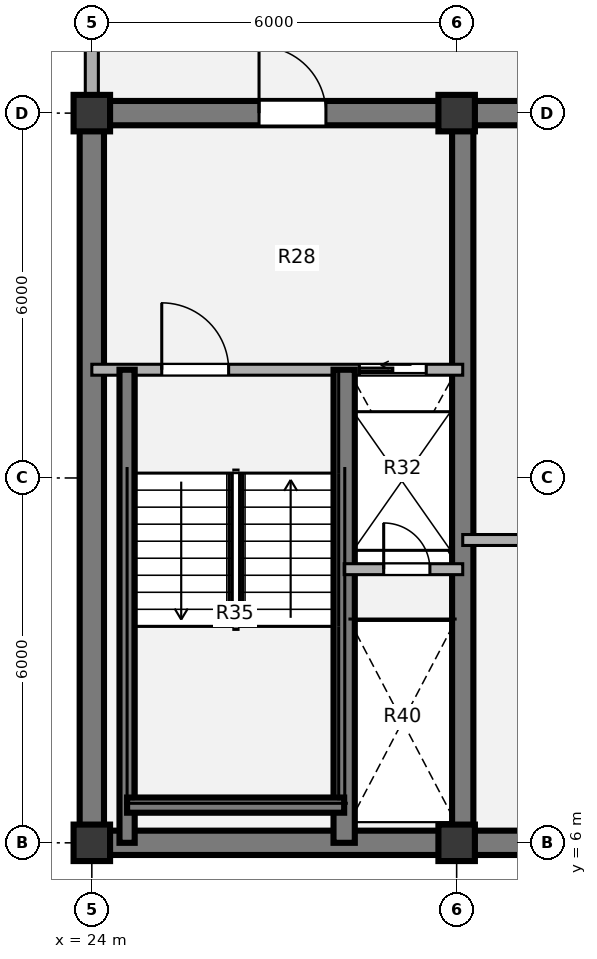
"""IFC4 building model, lengths in metres.
Left out: names, types, materials, properties, quantities, classifications, styles, units other than length and angle.
Written with IfcOpenShell. Run it as: python <this file> out.ifc"""

import sys

from ifc_helpers import new_model, si_unit, direction, frame, frame_2d, origin, origin_2d, place, context, subcontext, project, spatial, rectangle, extrude, source, transform, mapped, element, fill, save


model = new_model("IFC4")
c1 = context("Model", 3, precision=1e-05, world=origin(), true_north=direction((0.0, 1.0)))
c2 = subcontext(c1, "Body", "Model", "MODEL_VIEW")
j1 = project(units=[si_unit("LENGTHUNIT", "METRE"), si_unit("PLANEANGLEUNIT", "RADIAN")], contexts=[c1])
p1 = place(None, origin())
s1 = spatial("IfcSite", under=j1, at=p1, CompositionType="ELEMENT")
p2 = place(p1, origin())
s2 = spatial("IfcBuilding", under=s1, at=p2, CompositionType="ELEMENT")
p3 = place(p2, frame((0.0, 0.0, 230.58)))
s3 = spatial("IfcBuildingStorey", under=s2, at=p3, CompositionType="ELEMENT", Elevation=230.58)
m1 = source(origin(), c2, "Body", "SweptSolid", [
    extrude(rectangle(XDim=0.6, YDim=0.6, at=origin_2d()), origin(), (0.0, 0.0, 1.0), 3.78),
])
for number, where, z_axis, x_axis in (
    (1, (24.0, 6.0, 0.0), (0.0, 0.0, 1.0), (1.0, 0.0, 0.0)),
    (2, (30.0, 6.0, 0.0), (0.0, 0.0, 1.0), (1.0, 0.0, 0.0)),
    (3, (24.0, 18.0, 0.0), (0.0, 0.0, 1.0), (1.0, 0.0, 0.0)),
    (4, (30.0, 18.0, 0.0), (0.0, 0.0, 1.0), (1.0, 0.0, 0.0)),
):
    element("IfcColumn", number, at=place(p3, frame(where, z_axis=z_axis, x_axis=x_axis)), inside=s3, PredefinedType="COLUMN", context=c2, shape_type="MappedRepresentation", body=[
        mapped(m1, transform((0.0, 0.0, 0.0), x_axis=(1.0, 0.0, 0.0), y_axis=(0.0, 1.0, 0.0), z_axis=(0.0, 0.0, 1.0), scale=1.0)),
    ])
p4 = place(p3, frame((48.2, 6.0, 0.0), z_axis=(0.0, 0.0, 1.0), x_axis=(-1.0, 0.0, 0.0)))
e5 = element("IfcWall", 5, at=p4, inside=s3, PredefinedType="SHEAR", context=c2, shape_type="SweptSolid", body=[
    extrude(rectangle(XDim=24.4, YDim=0.4, at=frame_2d((12.2, 0.0))), origin(), (0.0, 0.0, 1.0), 3.78),
])
p5 = place(p3, frame((24.0, 6.0, 0.0), z_axis=(0.0, 0.0, 1.0), x_axis=(0.0, 1.0, 0.0)))
e6 = element("IfcWall", 6, at=p5, inside=s3, PredefinedType="SHEAR", context=c2, shape_type="SweptSolid", body=[
    extrude(rectangle(XDim=12.0, YDim=0.4, at=frame_2d((6.0, 0.0))), origin(), (0.0, 0.0, 1.0), 3.78),
])
p6 = place(p3, frame((23.8, 18.0, 0.0), z_axis=(0.0, 0.0, 1.0), x_axis=(1.0, 0.0, 0.0)))
e7 = element("IfcWall", 7, at=p6, inside=s3, PredefinedType="SHEAR", context=c2, shape_type="SweptSolid", body=[
    extrude(rectangle(XDim=9.4, YDim=0.4, at=frame_2d((4.7, 0.0))), origin(), (0.0, 0.0, 1.0), 3.78),
])
p7 = place(p6, frame((2.95, 0.0, 0.0)))
e8 = element("IfcOpeningElement", 8, at=p7, cuts=e7, PredefinedType="OPENING", context=c2, shape_type="SweptSolid", body=[
    extrude(rectangle(XDim=1.1, YDim=2.1, at=origin_2d()), frame((0.55, 0.21, 1.05), z_axis=(0.0, -1.0, 0.0), x_axis=(1.0, 0.0, 0.0)), (0.0, 0.0, 1.0), 0.42),
])
p8 = place(p3, frame((30.1, 6.0, 0.0), z_axis=(0.0, 0.0, 1.0), x_axis=(0.0, 1.0, 0.0)))
e9 = element("IfcWall", 9, at=p8, inside=s3, PredefinedType="SHEAR", context=c2, shape_type="SweptSolid", body=[
    extrude(rectangle(XDim=12.0, YDim=0.35, at=frame_2d((6.0, 0.0))), origin(), (0.0, 0.0, 1.0), 3.78),
])
p9 = place(p3, frame((24.0, 18.28, 0.0), z_axis=(0.0, 0.0, 1.0), x_axis=(0.0, 1.0, 0.0)))
e10 = element("IfcWall", 10, at=p9, inside=s3, PredefinedType="SOLIDWALL", context=c2, shape_type="SweptSolid", body=[
    extrude(rectangle(XDim=2.77, YDim=0.215, at=frame_2d((1.385, 0.0))), origin(), (0.0, 0.0, 1.0), 2.718),
])
p10 = place(p3, frame((30.1, 10.98, 0.0), z_axis=(0.0, 0.0, 1.0), x_axis=(1.0, 0.0, 0.0)))
e11 = element("IfcWall", 11, at=p10, inside=s3, PredefinedType="PARTITIONING", context=c2, shape_type="SweptSolid", body=[
    extrude(rectangle(XDim=4.08, YDim=0.18, at=frame_2d((2.04, 0.0))), origin(), (0.0, 0.0, 1.0), 3.5),
])
p11 = place(p3, frame((24.0, 13.78, 0.0), z_axis=(0.0, 0.0, 1.0), x_axis=(1.0, 0.0, 0.0)))
e12 = element("IfcWall", 12, at=p11, inside=s3, PredefinedType="PARTITIONING", context=c2, shape_type="SweptSolid", body=[
    extrude(rectangle(XDim=6.1, YDim=0.18, at=frame_2d((3.05, 0.0))), origin(), (0.0, 0.0, 1.0), 3.5),
])
p12 = place(p11, frame((1.15, 0.0, 0.0)))
e13 = element("IfcOpeningElement", 13, at=p12, cuts=e12, PredefinedType="OPENING", context=c2, shape_type="SweptSolid", body=[
    extrude(rectangle(XDim=1.1, YDim=2.1, at=origin_2d()), frame((0.55, 0.1, 1.05), z_axis=(0.0, -1.0, 0.0), x_axis=(1.0, 0.0, 0.0)), (0.0, 0.0, 1.0), 0.2),
])
p13 = place(p11, frame((4.4, 0.0, 0.0)))
e14 = element("IfcOpeningElement", 14, at=p13, cuts=e12, PredefinedType="OPENING", context=c2, shape_type="SweptSolid", body=[
    extrude(rectangle(XDim=1.1, YDim=2.1, at=origin_2d()), frame((0.55, 0.1, 1.05), z_axis=(0.0, -1.0, 0.0), x_axis=(1.0, 0.0, 0.0)), (0.0, 0.0, 1.0), 0.2),
])
p14 = place(p3, frame((28.15, 6.0, 0.0), z_axis=(0.0, 0.0, 1.0), x_axis=(0.0, 1.0, 0.0)))
e15 = element("IfcWall", 15, at=p14, inside=s3, PredefinedType="SHEAR", context=c2, shape_type="SweptSolid", body=[
    extrude(rectangle(XDim=7.78, YDim=0.35, at=frame_2d((3.89, 0.0))), origin(), (0.0, 0.0, 1.0), 3.85),
])
p15 = place(p3, frame((24.58, 6.0, 0.0), z_axis=(0.0, 0.0, 1.0), x_axis=(0.0, 1.0, 0.0)))
e16 = element("IfcWall", 16, at=p15, inside=s3, PredefinedType="SHEAR", context=c2, shape_type="SweptSolid", body=[
    extrude(rectangle(XDim=7.78, YDim=0.25, at=frame_2d((3.89, 0.0))), origin(), (0.0, 0.0, 1.0), 3.85),
])
p16 = place(p3, frame((24.58, 6.62, 0.0), z_axis=(0.0, 0.0, 1.0), x_axis=(1.0, 0.0, 0.0)))
e17 = element("IfcWall", 17, at=p16, inside=s3, PredefinedType="SHEAR", context=c2, shape_type="SweptSolid", body=[
    extrude(rectangle(XDim=3.57, YDim=0.25, at=frame_2d((1.785, 0.0))), origin(), (0.0, 0.0, 1.0), 3.85),
])
p17 = place(p3, frame((28.15, 10.5, 0.0), z_axis=(0.0, 0.0, 1.0), x_axis=(1.0, 0.0, 0.0)))
e18 = element("IfcWall", 18, at=p17, inside=s3, PredefinedType="PARTITIONING", context=c2, shape_type="SweptSolid", body=[
    extrude(rectangle(XDim=1.95, YDim=0.18, at=frame_2d((0.975, 0.0))), origin(), (0.0, 0.0, 1.0), 3.5),
])
p18 = place(p17, frame((0.65, 0.0, 0.0)))
e19 = element("IfcOpeningElement", 19, at=p18, cuts=e18, PredefinedType="OPENING", context=c2, shape_type="SweptSolid", body=[
    extrude(rectangle(XDim=0.76, YDim=2.05, at=origin_2d()), frame((0.38, 0.1, 1.025), z_axis=(0.0, -1.0, 0.0), x_axis=(1.0, 0.0, 0.0)), (0.0, 0.0, 1.0), 0.2),
])
m2 = source(origin(), c2, "Body", "SweptSolid", [
    extrude(rectangle(XDim=1.1, YDim=2.1, at=origin_2d()), frame((0.55, 0.025, 1.05), z_axis=(0.0, -1.0, 0.0), x_axis=(1.0, 0.0, 0.0)), (0.0, 0.0, 1.0), 0.05),
])
p19 = place(p12, origin())
e20 = element("IfcDoor", 20, at=p19, inside=s3, OperationType="SINGLE_SWING_LEFT", PredefinedType="DOOR", context=c2, shape_type="MappedRepresentation", body=[
    mapped(m2, transform((0.0, 0.0, 0.0), x_axis=(1.0, 0.0, 0.0), y_axis=(0.0, 1.0, 0.0), z_axis=(0.0, 0.0, 1.0), scale=1.0)),
])
fill(e13, e20)
m3 = source(origin(), c2, "Body", "SweptSolid", [
    extrude(rectangle(XDim=1.1, YDim=2.1, at=origin_2d()), frame((0.55, 0.025, 1.05), z_axis=(0.0, -1.0, 0.0), x_axis=(1.0, 0.0, 0.0)), (0.0, 0.0, 1.0), 0.05),
])
p20 = place(p13, origin())
e21 = element("IfcDoor", 21, at=p20, inside=s3, OperationType="SLIDING_TO_LEFT", PredefinedType="DOOR", context=c2, shape_type="MappedRepresentation", body=[
    mapped(m3, transform((0.0, 0.0, 0.0), x_axis=(1.0, 0.0, 0.0), y_axis=(0.0, 1.0, 0.0), z_axis=(0.0, 0.0, 1.0), scale=1.0)),
])
fill(e14, e21)
m4 = source(origin(), c2, "Body", "SweptSolid", [
    extrude(rectangle(XDim=0.76, YDim=2.05, at=origin_2d()), frame((0.38, 0.025, 1.025), z_axis=(0.0, -1.0, 0.0), x_axis=(1.0, 0.0, 0.0)), (0.0, 0.0, 1.0), 0.05),
])
p21 = place(p18, origin())
e22 = element("IfcDoor", 22, at=p21, inside=s3, OperationType="SINGLE_SWING_LEFT", PredefinedType="DOOR", context=c2, shape_type="MappedRepresentation", body=[
    mapped(m4, transform((0.0, 0.0, 0.0), x_axis=(1.0, 0.0, 0.0), y_axis=(0.0, 1.0, 0.0), z_axis=(0.0, 0.0, 1.0), scale=1.0)),
])
fill(e19, e22)
m5 = source(origin(), c2, "Body", "SweptSolid", [
    extrude(rectangle(XDim=1.1, YDim=2.1, at=origin_2d()), frame((0.55, 0.025, 1.05), z_axis=(0.0, -1.0, 0.0), x_axis=(1.0, 0.0, 0.0)), (0.0, 0.0, 1.0), 0.05),
])
p22 = place(p7, origin())
e23 = element("IfcDoor", 23, at=p22, inside=s3, OperationType="SINGLE_SWING_LEFT", PredefinedType="DOOR", context=c2, shape_type="MappedRepresentation", body=[
    mapped(m5, transform((0.0, 0.0, 0.0), x_axis=(1.0, 0.0, 0.0), y_axis=(0.0, 1.0, 0.0), z_axis=(0.0, 0.0, 1.0), scale=1.0)),
])
fill(e8, e23)
save(model, sys.argv[1])
